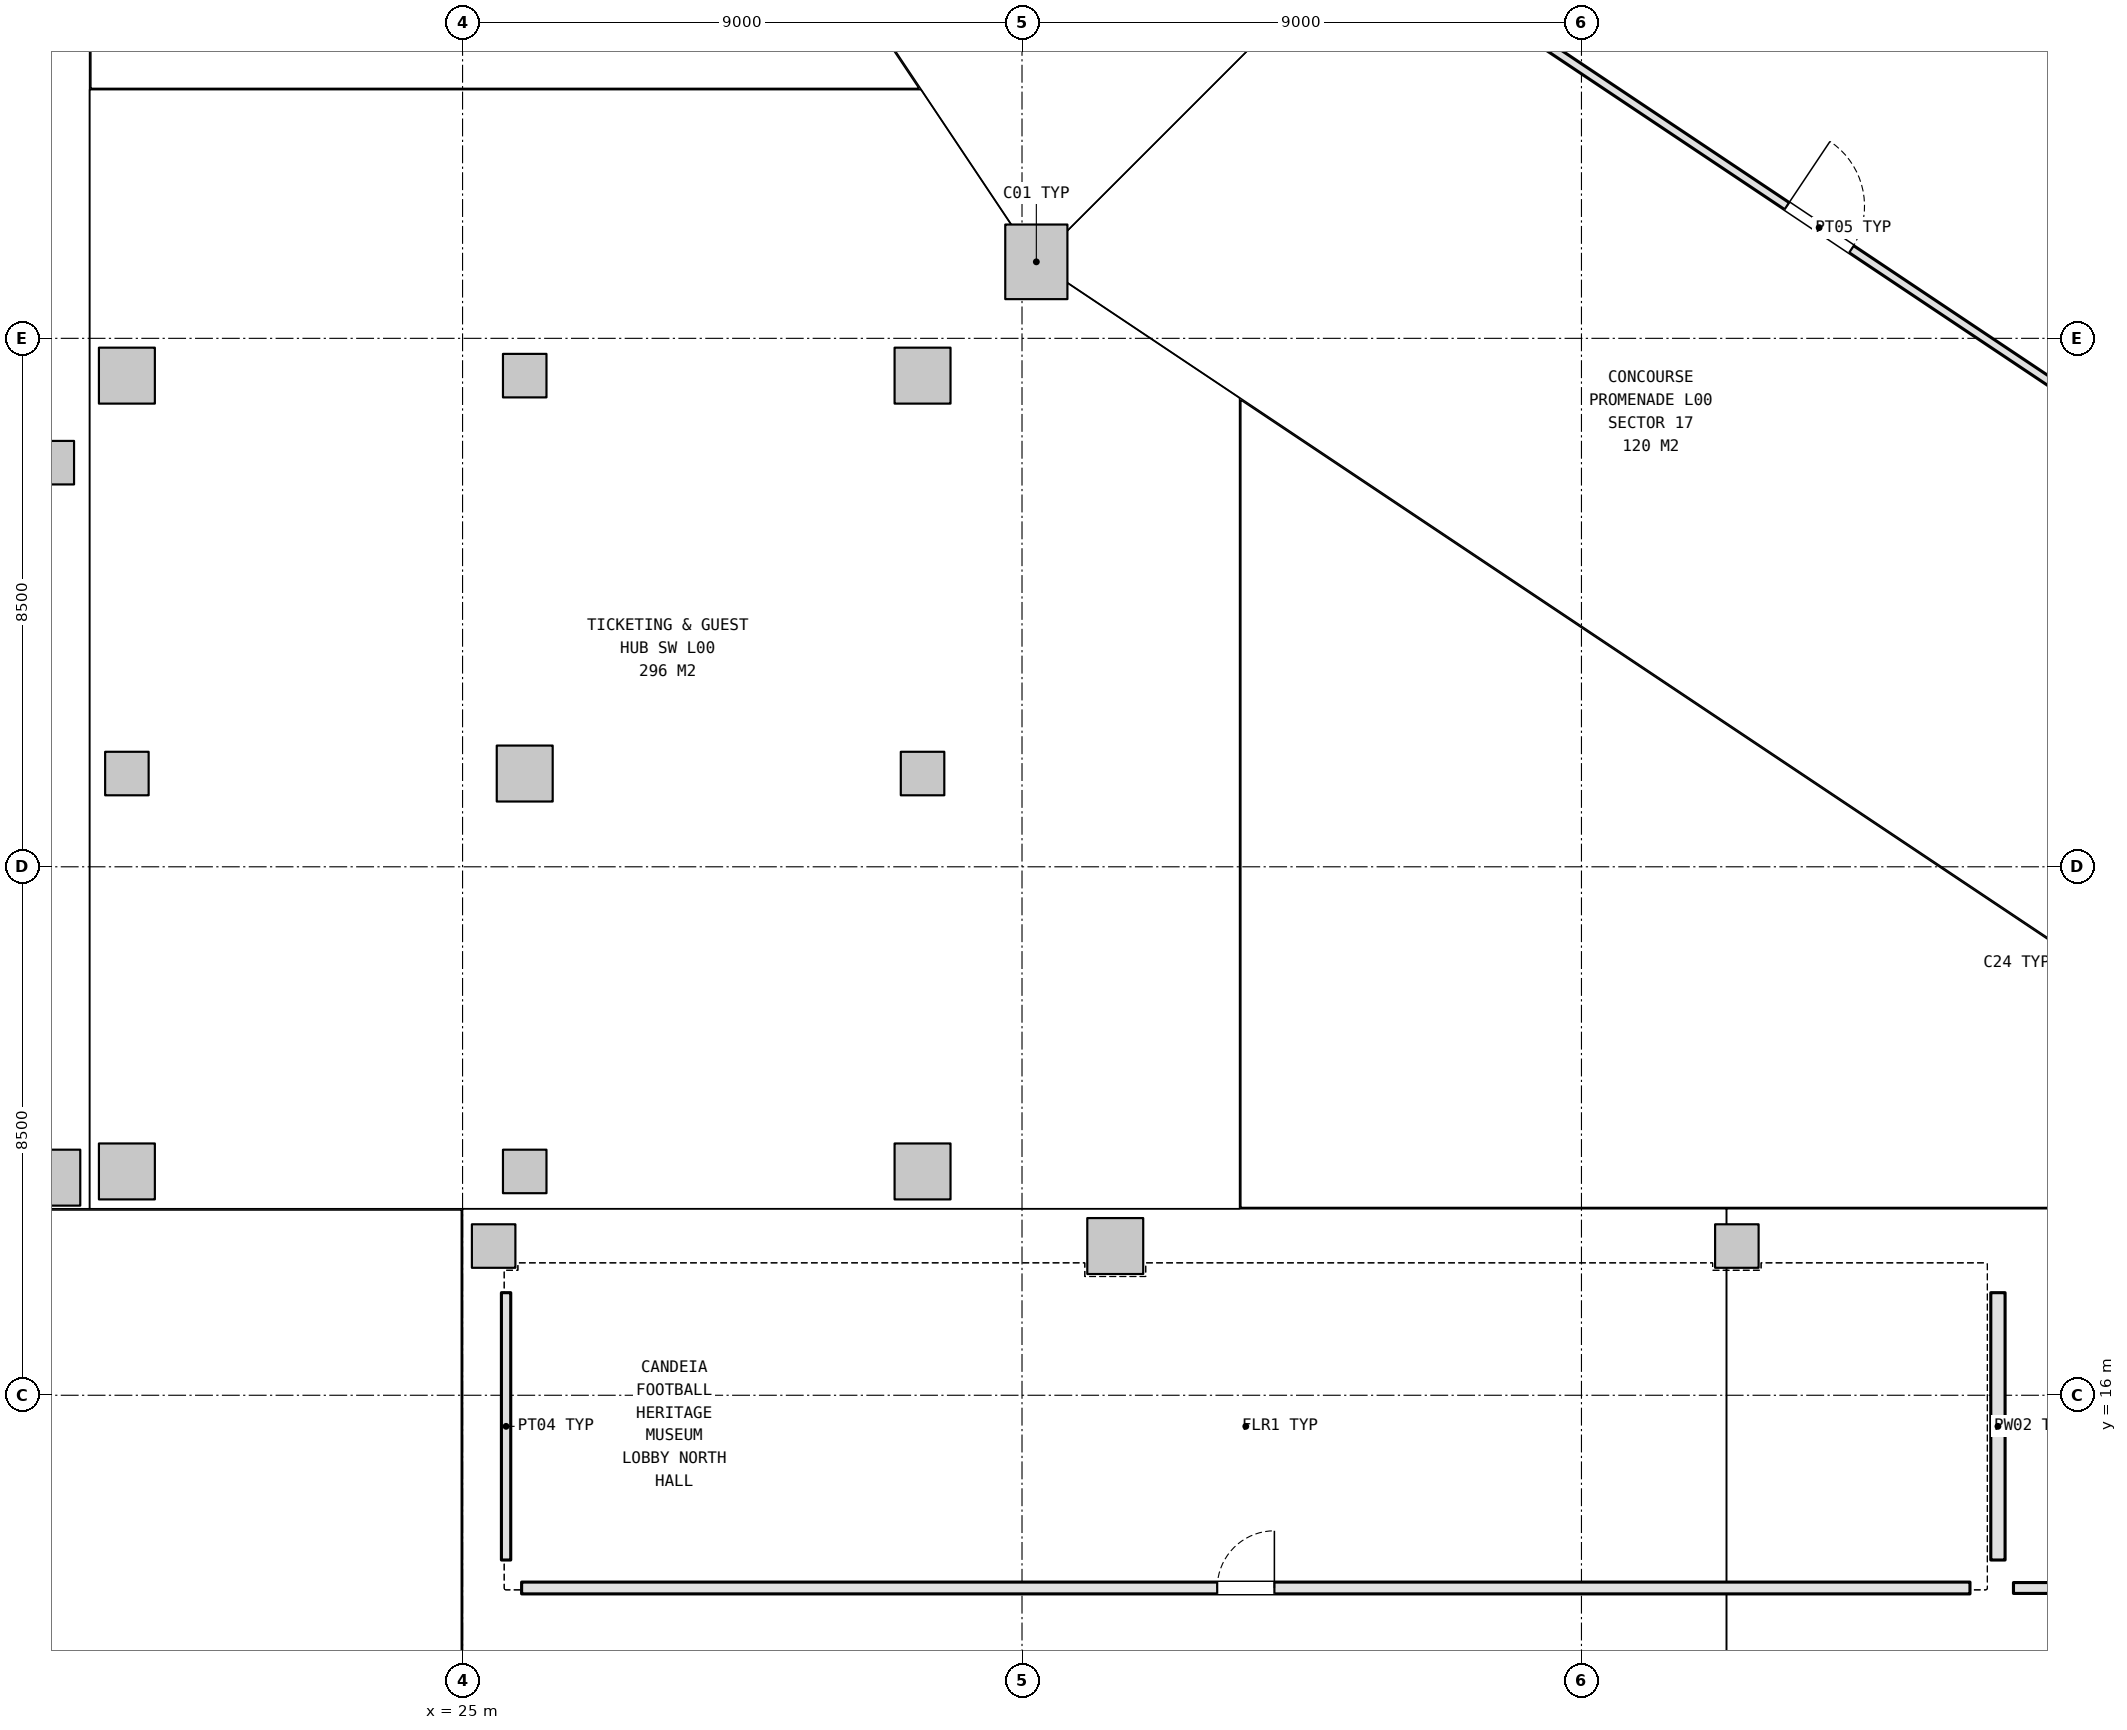
"""IFC4 building model, lengths in metres.
Left out: names, types, materials, properties, quantities, classifications, styles, units other than length and angle.
Written with IfcOpenShell. Run it as: python <this file> out.ifc"""

import sys

from ifc_helpers import new_model, si_unit, direction, frame, frame_2d, origin, origin_2d, place, context, subcontext, project, spatial, rectangle, extrude, element, fill, save


model = new_model("IFC4")
c1 = context("Model", 3, precision=1e-05, world=origin(), true_north=direction((0.0, 1.0)))
c2 = subcontext(c1, "Body", "Model", "MODEL_VIEW")
j1 = project(units=[si_unit("LENGTHUNIT", "METRE"), si_unit("PLANEANGLEUNIT", "RADIAN")], contexts=[c1])
p1 = place(None, origin())
s1 = spatial("IfcSite", under=j1, at=p1, CompositionType="ELEMENT")
p2 = place(p1, origin())
s2 = spatial("IfcBuilding", under=s1, at=p2, CompositionType="ELEMENT")
p3 = place(p2, origin())
s3 = spatial("IfcBuildingStorey", under=s2, at=p3, CompositionType="ELEMENT", Elevation=0.0)
p4 = place(p3, frame((34.23, 34.23, 0.0), z_axis=(0.0, 0.0, 1.0), x_axis=(1.0, 0.0, 0.0)))
e1 = element("IfcColumn", 1, at=p4, inside=s3, PredefinedType="COLUMN", context=c2, shape_type="SweptSolid", body=[
    extrude(rectangle(XDim=1.0, YDim=1.2, at=origin_2d()), origin(), (0.0, 0.0, 1.0), 5.4),
])
p5 = place(p3, frame((18.4, 19.5, 0.0), z_axis=(0.0, 0.0, 1.0), x_axis=(1.0, 0.0, 0.0)))
e2 = element("IfcColumn", 2, at=p5, inside=s3, PredefinedType="COLUMN", context=c2, shape_type="SweptSolid", body=[
    extrude(rectangle(XDim=0.9, YDim=0.9, at=origin_2d()), origin(), (0.0, 0.0, 1.0), 5.4),
])
for number, where, z_axis, x_axis in (
    (3, (18.4, 31.0, 0.0), (0.0, 0.0, 1.0), (1.0, 0.0, 0.0)),
    (4, (25.5, 18.4, 0.0), (0.0, 0.0, 1.0), (1.0, 0.0, 0.0)),
):
    element("IfcColumn", number, at=place(p3, frame(where, z_axis=z_axis, x_axis=x_axis)), inside=s3, PredefinedType="COLUMN", context=c2, shape_type="SweptSolid", body=[
        extrude(rectangle(XDim=0.7, YDim=0.7, at=origin_2d()), origin(), (0.0, 0.0, 1.0), 5.4),
    ])
p6 = place(p3, frame((35.5, 18.4, 0.0), z_axis=(0.0, 0.0, 1.0), x_axis=(1.0, 0.0, 0.0)))
e5 = element("IfcColumn", 5, at=p6, inside=s3, PredefinedType="COLUMN", context=c2, shape_type="SweptSolid", body=[
    extrude(rectangle(XDim=0.9, YDim=0.9, at=origin_2d()), origin(), (0.0, 0.0, 1.0), 5.4),
])
p7 = place(p3, frame((45.5, 18.4, 0.0), z_axis=(0.0, 0.0, 1.0), x_axis=(1.0, 0.0, 0.0)))
e6 = element("IfcColumn", 6, at=p7, inside=s3, PredefinedType="COLUMN", context=c2, shape_type="SweptSolid", body=[
    extrude(rectangle(XDim=0.7, YDim=0.7, at=origin_2d()), origin(), (0.0, 0.0, 1.0), 5.4),
])
p8 = place(p3, frame((19.6, 19.6, 0.0), z_axis=(0.0, 0.0, 1.0), x_axis=(1.0, 0.0, 0.0)))
e7 = element("IfcColumn", 7, at=p8, inside=s3, PredefinedType="COLUMN", context=c2, shape_type="SweptSolid", body=[
    extrude(rectangle(XDim=0.9, YDim=0.9, at=origin_2d()), origin(), (0.0, 0.0, 1.0), 5.4),
])
p9 = place(p3, frame((19.6, 26.0, 0.0), z_axis=(0.0, 0.0, 1.0), x_axis=(1.0, 0.0, 0.0)))
e8 = element("IfcColumn", 8, at=p9, inside=s3, PredefinedType="COLUMN", context=c2, shape_type="SweptSolid", body=[
    extrude(rectangle(XDim=0.7, YDim=0.7, at=origin_2d()), origin(), (0.0, 0.0, 1.0), 5.4),
])
p10 = place(p3, frame((19.6, 32.4, 0.0), z_axis=(0.0, 0.0, 1.0), x_axis=(1.0, 0.0, 0.0)))
e9 = element("IfcColumn", 9, at=p10, inside=s3, PredefinedType="COLUMN", context=c2, shape_type="SweptSolid", body=[
    extrude(rectangle(XDim=0.9, YDim=0.9, at=origin_2d()), origin(), (0.0, 0.0, 1.0), 5.4),
])
p11 = place(p3, frame((26.0, 19.6, 0.0), z_axis=(0.0, 0.0, 1.0), x_axis=(1.0, 0.0, 0.0)))
e10 = element("IfcColumn", 10, at=p11, inside=s3, PredefinedType="COLUMN", context=c2, shape_type="SweptSolid", body=[
    extrude(rectangle(XDim=0.7, YDim=0.7, at=origin_2d()), origin(), (0.0, 0.0, 1.0), 5.4),
])
p12 = place(p3, frame((26.0, 26.0, 0.0), z_axis=(0.0, 0.0, 1.0), x_axis=(1.0, 0.0, 0.0)))
e11 = element("IfcColumn", 11, at=p12, inside=s3, PredefinedType="COLUMN", context=c2, shape_type="SweptSolid", body=[
    extrude(rectangle(XDim=0.9, YDim=0.9, at=origin_2d()), origin(), (0.0, 0.0, 1.0), 5.4),
])
p13 = place(p3, frame((26.0, 32.4, 0.0), z_axis=(0.0, 0.0, 1.0), x_axis=(1.0, 0.0, 0.0)))
e12 = element("IfcColumn", 12, at=p13, inside=s3, PredefinedType="COLUMN", context=c2, shape_type="SweptSolid", body=[
    extrude(rectangle(XDim=0.7, YDim=0.7, at=origin_2d()), origin(), (0.0, 0.0, 1.0), 5.4),
])
p14 = place(p3, frame((32.4, 19.6, 0.0), z_axis=(0.0, 0.0, 1.0), x_axis=(1.0, 0.0, 0.0)))
e13 = element("IfcColumn", 13, at=p14, inside=s3, PredefinedType="COLUMN", context=c2, shape_type="SweptSolid", body=[
    extrude(rectangle(XDim=0.9, YDim=0.9, at=origin_2d()), origin(), (0.0, 0.0, 1.0), 5.4),
])
p15 = place(p3, frame((32.4, 26.0, 0.0), z_axis=(0.0, 0.0, 1.0), x_axis=(1.0, 0.0, 0.0)))
e14 = element("IfcColumn", 14, at=p15, inside=s3, PredefinedType="COLUMN", context=c2, shape_type="SweptSolid", body=[
    extrude(rectangle(XDim=0.7, YDim=0.7, at=origin_2d()), origin(), (0.0, 0.0, 1.0), 5.4),
])
p16 = place(p3, frame((32.4, 32.4, 0.0), z_axis=(0.0, 0.0, 1.0), x_axis=(1.0, 0.0, 0.0)))
e15 = element("IfcColumn", 15, at=p16, inside=s3, PredefinedType="COLUMN", context=c2, shape_type="SweptSolid", body=[
    extrude(rectangle(XDim=0.9, YDim=0.9, at=origin_2d()), origin(), (0.0, 0.0, 1.0), 5.4),
])
p17 = place(p3, frame((49.25, 12.9, 0.0), z_axis=(0.0, 0.0, 1.0), x_axis=(-1.0, 0.0, 0.0)))
e16 = element("IfcWall", 16, at=p17, inside=s3, PredefinedType="PARTITIONING", context=c2, shape_type="SweptSolid", body=[
    extrude(rectangle(XDim=23.3, YDim=0.19, at=frame_2d((11.65, 0.0))), origin(), (0.0, 0.0, 1.0), 4.425),
])
p18 = place(p17, frame((11.19, 0.0, 0.0)))
e17 = element("IfcOpeningElement", 17, at=p18, cuts=e16, PredefinedType="OPENING", context=c2, shape_type="SweptSolid", body=[
    extrude(rectangle(XDim=0.92, YDim=2.1, at=frame_2d((0.46, 1.05))), frame((0.0, 0.105, 0.0), z_axis=(0.0, -1.0, 0.0), x_axis=(1.0, 0.0, 0.0)), (0.0, 0.0, 1.0), 0.21),
])
p19 = place(p3, frame((25.7, 13.35, 0.0), z_axis=(0.0, 0.0, 1.0), x_axis=(0.0, 1.0, 0.0)))
e18 = element("IfcWall", 18, at=p19, inside=s3, PredefinedType="PARTITIONING", context=c2, shape_type="SweptSolid", body=[
    extrude(rectangle(XDim=4.3, YDim=0.15, at=frame_2d((2.15, 0.0))), origin(), (0.0, 0.0, 1.0), 4.475),
])
p20 = place(p3, frame((66.91, 12.9, 0.0), z_axis=(0.0, 0.0, 1.0), x_axis=(-1.0, 0.0, 0.0)))
e19 = element("IfcWall", 19, at=p20, inside=s3, PredefinedType="PARTITIONING", context=c2, shape_type="SweptSolid", body=[
    extrude(rectangle(XDim=16.96, YDim=0.175, at=frame_2d((8.48, 0.0))), origin(), (0.0, 0.0, 1.0), 4.425),
])
p21 = place(p20, frame((7.68, 0.0, 0.0)))
e20 = element("IfcOpeningElement", 20, at=p21, cuts=e19, PredefinedType="OPENING", context=c2, shape_type="SweptSolid", body=[
    extrude(rectangle(XDim=1.6, YDim=2.2, at=frame_2d((0.8, 1.1))), frame((0.0, 0.097, 0.0), z_axis=(0.0, -1.0, 0.0), x_axis=(1.0, 0.0, 0.0)), (0.0, 0.0, 1.0), 0.195),
])
p22 = place(p3, frame((49.7, 13.35, 0.0), z_axis=(0.0, 0.0, 1.0), x_axis=(0.0, 1.0, 0.0)))
e21 = element("IfcWall", 21, at=p22, inside=s3, PredefinedType="PLUMBINGWALL", context=c2, shape_type="SweptSolid", body=[
    extrude(rectangle(XDim=4.3, YDim=0.23, at=frame_2d((2.15, 0.0))), origin(), (0.0, 0.0, 1.0), 4.625),
])
p23 = place(p3, frame((53.801, 30.119, 0.0), z_axis=(0.0, 0.0, 1.0), x_axis=(-0.831472453136, 0.555565981388, 0.0)))
e22 = element("IfcWall", 22, at=p23, inside=s3, PredefinedType="PARTITIONING", context=c2, shape_type="SweptSolid", body=[
    extrude(rectangle(XDim=16.783, YDim=0.135, at=frame_2d((8.392, 0.0))), origin(), (0.0, 0.0, 1.0), 4.345),
])
p24 = place(p23, frame((7.767, 0.0, 0.0)))
e23 = element("IfcOpeningElement", 23, at=p24, cuts=e22, PredefinedType="OPENING", context=c2, shape_type="SweptSolid", body=[
    extrude(rectangle(XDim=1.25, YDim=2.2, at=frame_2d((0.625, 1.1))), frame((0.0, 0.077, 0.0), z_axis=(0.0, -1.0, 0.0), x_axis=(1.0, 0.0, 0.0)), (0.0, 0.0, 1.0), 0.155),
])
p25 = place(p18, frame((0.92, 0.0, 0.0), z_axis=(0.0, 0.0, 1.0), x_axis=(-1.0, 0.0, 0.0)))
e24 = element("IfcDoor", 24, at=p25, inside=s3, OperationType="SINGLE_SWING_LEFT", PredefinedType="DOOR", context=c2, shape_type="SweptSolid", body=[
    extrude(rectangle(XDim=0.92, YDim=2.1, at=frame_2d((0.46, 1.05))), frame((0.0, 0.025, 0.0), z_axis=(0.0, -1.0, 0.0), x_axis=(1.0, 0.0, 0.0)), (0.0, 0.0, 1.0), 0.05),
])
fill(e17, e24)
p26 = place(p24, frame((1.25, 0.0, 0.0), z_axis=(0.0, 0.0, 1.0), x_axis=(-1.0, 0.0, 0.0)))
e25 = element("IfcDoor", 25, at=p26, inside=s3, OperationType="SINGLE_SWING_RIGHT", PredefinedType="DOOR", context=c2, shape_type="SweptSolid", body=[
    extrude(rectangle(XDim=1.25, YDim=2.2, at=frame_2d((0.625, 1.1))), frame((0.0, 0.025, 0.0), z_axis=(0.0, -1.0, 0.0), x_axis=(1.0, 0.0, 0.0)), (0.0, 0.0, 1.0), 0.05),
])
fill(e23, e25)
save(model, sys.argv[1])
